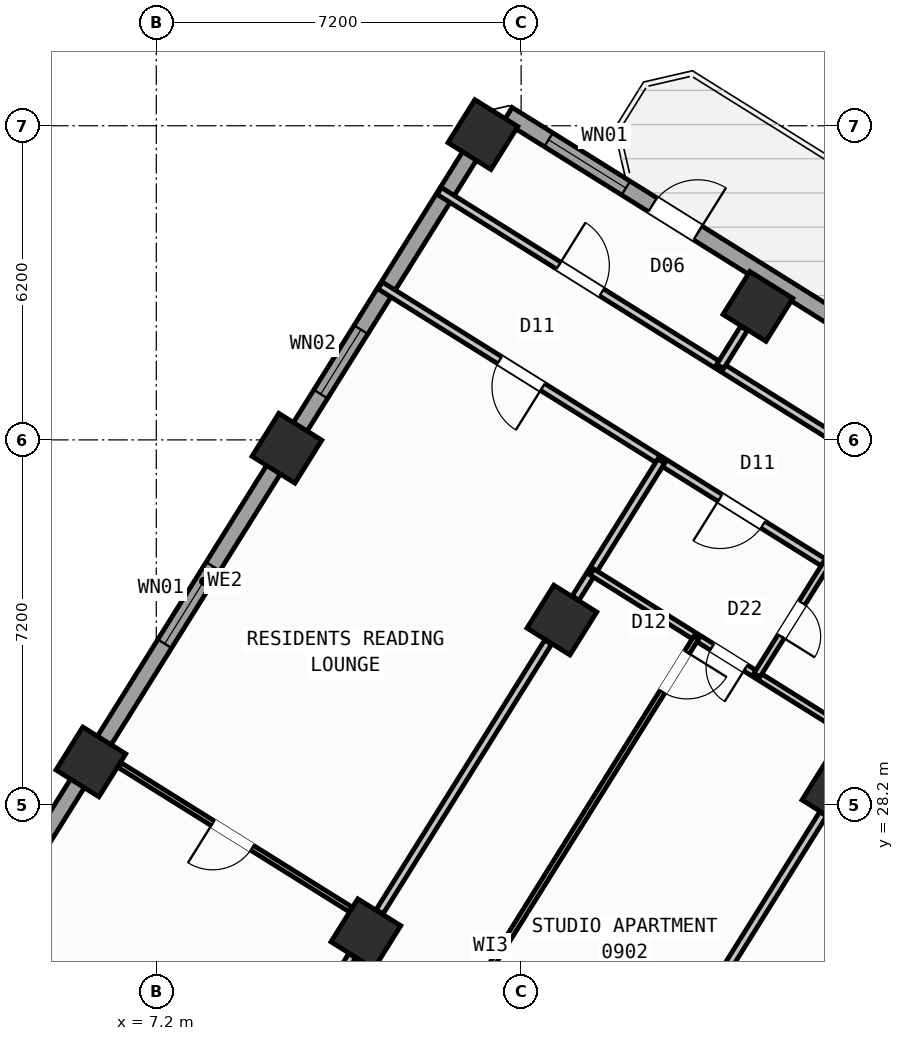
"""IFC4 building model, lengths in metres.
Left out: names, types, materials, properties, quantities, classifications, styles, units other than length and angle.
Written with IfcOpenShell. Run it as: python <this file> out.ifc"""

import sys

from ifc_helpers import new_model, si_unit, direction, frame, frame_2d, origin, origin_2d, place, context, subcontext, project, spatial, rectangle, hollow_rectangle, extrude, source, transform, mapped, element, fill, save


model = new_model("IFC4")
c1 = context("Model", 3, precision=1e-05, world=origin(), true_north=direction((0.0, 1.0)))
c2 = subcontext(c1, "Body", "Model", "MODEL_VIEW")
j1 = project(units=[si_unit("LENGTHUNIT", "METRE"), si_unit("PLANEANGLEUNIT", "RADIAN")], contexts=[c1])
p1 = place(None, origin())
s1 = spatial("IfcSite", under=j1, at=p1, CompositionType="ELEMENT")
p2 = place(p1, origin())
s2 = spatial("IfcBuilding", under=s1, at=p2, CompositionType="ELEMENT")
p3 = place(p2, frame((0.0, 0.0, 38.4)))
s3 = spatial("IfcBuildingStorey", under=s2, at=p3, CompositionType="ELEMENT", Elevation=38.4)
m1 = source(origin(), c2, "Body", "SweptSolid", [
    extrude(hollow_rectangle(XDim=1.0, YDim=1.0, WallThickness=0.04, at=origin_2d()), origin(), (0.0, 0.0, 1.0), 3.6),
])
for number, where, z_axis, x_axis in (
    (1, (20.632, 28.452, 0.0), (0.0, 0.0, 1.0), (-0.848, 0.53, 0.0)),
    (2, (19.073, 38.034, 0.0), (0.0, 0.0, 1.0), (-0.848, 0.53, 0.0)),
    (3, (15.205, 31.844, 0.0), (0.0, 0.0, 1.0), (-0.848, 0.53, 0.0)),
    (4, (11.336, 25.653, 0.0), (0.0, 0.0, 1.0), (-0.848, 0.53, 0.0)),
    (5, (13.646, 41.426, 0.0), (0.0, 0.0, 1.0), (-0.848, 0.53, 0.0)),
    (6, (9.777, 35.235, 0.0), (0.0, 0.0, 1.0), (-0.848, 0.53, 0.0)),
    (7, (5.909, 29.044, 0.0), (0.0, 0.0, 1.0), (-0.848, 0.53, 0.0)),
):
    element("IfcColumn", number, at=place(p3, frame(where, z_axis=z_axis, x_axis=x_axis)), inside=s3, PredefinedType="COLUMN", context=c2, shape_type="MappedRepresentation", body=[
        mapped(m1, transform((0.0, 0.0, 0.0), scale=1.0)),
    ])
p4 = place(p3, frame((2.415, 23.452, 0.0), z_axis=(0.0, 0.0, 1.0), x_axis=(0.52991049553, 0.848053575387, 0.0)))
e8 = element("IfcWall", 8, at=p4, inside=s3, PredefinedType="STANDARD", context=c2, shape_type="SweptSolid", body=[
    extrude(rectangle(XDim=21.587, YDim=0.32, at=frame_2d((10.794, 0.0))), origin(), (0.0, 0.0, 1.0), 2.725),
])
p5 = place(p4, frame((2.356, 0.0, 0.8)))
e9 = element("IfcOpeningElement", 9, at=p5, cuts=e8, PredefinedType="OPENING", context=c2, shape_type="SweptSolid", body=[
    extrude(rectangle(XDim=2.1, YDim=1.55, at=frame_2d((1.05, 0.775))), frame((0.0, 0.17, 0.0), z_axis=(0.0, -1.0, 0.0), x_axis=(1.0, 0.0, 0.0)), (0.0, 0.0, 1.0), 0.34),
])
p6 = place(p4, frame((9.344, 0.0, 0.85)))
e10 = element("IfcOpeningElement", 10, at=p6, cuts=e8, PredefinedType="OPENING", context=c2, shape_type="SweptSolid", body=[
    extrude(rectangle(XDim=1.8, YDim=1.5, at=frame_2d((0.9, 0.75))), frame((0.0, 0.17, 0.0), z_axis=(0.0, -1.0, 0.0), x_axis=(1.0, 0.0, 0.0)), (0.0, 0.0, 1.0), 0.34),
])
p7 = place(p4, frame((15.154, 0.0, 0.85)))
e11 = element("IfcOpeningElement", 11, at=p7, cuts=e8, PredefinedType="OPENING", context=c2, shape_type="SweptSolid", body=[
    extrude(rectangle(XDim=1.5, YDim=1.5, at=frame_2d((0.75, 0.75))), frame((0.0, 0.17, 0.0), z_axis=(0.0, -1.0, 0.0), x_axis=(1.0, 0.0, 0.0)), (0.0, 0.0, 1.0), 0.34),
])
p8 = place(p3, frame((14.138, 41.825, 0.0), z_axis=(0.0, 0.0, 1.0), x_axis=(0.848046498049, -0.529921821731, 0.0)))
e12 = element("IfcWall", 12, at=p8, inside=s3, PredefinedType="STANDARD", context=c2, shape_type="SweptSolid", body=[
    extrude(rectangle(XDim=31.588, YDim=0.32, at=frame_2d((15.794, 0.0))), origin(), (0.0, 0.0, 1.0), 3.35),
])
p9 = place(p8, frame((3.369, 0.0, 0.0)))
e13 = element("IfcOpeningElement", 13, at=p9, cuts=e12, PredefinedType="OPENING", context=c2, shape_type="SweptSolid", body=[
    extrude(rectangle(XDim=1.05, YDim=2.15, at=frame_2d((0.525, 1.075))), frame((0.0, 0.17, 0.0), z_axis=(0.0, -1.0, 0.0), x_axis=(1.0, 0.0, 0.0)), (0.0, 0.0, 1.0), 0.34),
])
p10 = place(p8, frame((0.946, 0.0, 0.85)))
e14 = element("IfcOpeningElement", 14, at=p10, cuts=e12, PredefinedType="OPENING", context=c2, shape_type="SweptSolid", body=[
    extrude(rectangle(XDim=1.8, YDim=1.5, at=frame_2d((0.9, 0.75))), frame((0.0, 0.17, 0.0), z_axis=(0.0, -1.0, 0.0), x_axis=(1.0, 0.0, 0.0)), (0.0, 0.0, 1.0), 0.34),
])
p11 = place(p8, frame((8.46, 0.0, 0.85)))
e15 = element("IfcOpeningElement", 15, at=p11, cuts=e12, PredefinedType="OPENING", context=c2, shape_type="SweptSolid", body=[
    extrude(rectangle(XDim=1.8, YDim=1.5, at=frame_2d((0.9, 0.75))), frame((0.0, 0.17, 0.0), z_axis=(0.0, -1.0, 0.0), x_axis=(1.0, 0.0, 0.0)), (0.0, 0.0, 1.0), 0.34),
])
p12 = place(p8, frame((13.899, 0.0, 0.85)))
e16 = element("IfcOpeningElement", 16, at=p12, cuts=e12, PredefinedType="OPENING", context=c2, shape_type="SweptSolid", body=[
    extrude(rectangle(XDim=1.5, YDim=1.5, at=frame_2d((0.75, 0.75))), frame((0.0, 0.17, 0.0), z_axis=(0.0, -1.0, 0.0), x_axis=(1.0, 0.0, 0.0)), (0.0, 0.0, 1.0), 0.34),
])
p13 = place(p8, frame((22.019, 0.0, 0.95)))
e17 = element("IfcOpeningElement", 17, at=p13, cuts=e12, PredefinedType="OPENING", context=c2, shape_type="SweptSolid", body=[
    extrude(rectangle(XDim=1.2, YDim=1.4, at=frame_2d((0.6, 0.7))), frame((0.0, 0.17, 0.0), z_axis=(0.0, -1.0, 0.0), x_axis=(1.0, 0.0, 0.0)), (0.0, 0.0, 1.0), 0.34),
])
p14 = place(p8, frame((27.569, 0.0, 0.95)))
e18 = element("IfcOpeningElement", 18, at=p14, cuts=e12, PredefinedType="OPENING", context=c2, shape_type="SweptSolid", body=[
    extrude(rectangle(XDim=1.2, YDim=1.4, at=frame_2d((0.6, 0.7))), frame((0.0, 0.17, 0.0), z_axis=(0.0, -1.0, 0.0), x_axis=(1.0, 0.0, 0.0)), (0.0, 0.0, 1.0), 0.34),
])
p15 = place(p3, frame((25.807, 29.582, 0.0), z_axis=(0.0, 0.0, 1.0), x_axis=(-0.529918119251, -0.84804881162, 0.0)))
e19 = element("IfcWall", 19, at=p15, inside=s3, PredefinedType="PARTITIONING", context=c2, shape_type="SweptSolid", body=[
    extrude(rectangle(XDim=17.65, YDim=0.16, at=frame_2d((8.825, 0.0))), origin(), (0.0, 0.0, 1.0), 3.34),
])
p16 = place(p3, frame((26.973, 31.447, 0.0), z_axis=(0.0, 0.0, 1.0), x_axis=(-0.848048310262, 0.529918921593, 0.0)))
e20 = element("IfcWall", 20, at=p16, inside=s3, PredefinedType="PARTITIONING", context=c2, shape_type="SweptSolid", body=[
    extrude(rectangle(XDim=16.73, YDim=0.16, at=frame_2d((8.365, 0.0))), origin(), (0.0, 0.0, 1.0), 3.34),
])
p17 = place(p16, frame((1.588, 0.0, 0.0)))
e21 = element("IfcOpeningElement", 21, at=p17, cuts=e20, PredefinedType="OPENING", context=c2, shape_type="SweptSolid", body=[
    extrude(rectangle(XDim=1.0, YDim=2.1, at=frame_2d((0.5, 1.05))), frame((0.0, 0.09, 0.0), z_axis=(0.0, -1.0, 0.0), x_axis=(1.0, 0.0, 0.0)), (0.0, 0.0, 1.0), 0.18),
])
p18 = place(p16, frame((6.685, 0.0, 0.0)))
e22 = element("IfcOpeningElement", 22, at=p18, cuts=e20, PredefinedType="OPENING", context=c2, shape_type="SweptSolid", body=[
    extrude(rectangle(XDim=1.0, YDim=2.1, at=frame_2d((0.5, 1.05))), frame((0.0, 0.09, 0.0), z_axis=(0.0, -1.0, 0.0), x_axis=(1.0, 0.0, 0.0)), (0.0, 0.0, 1.0), 0.18),
])
p19 = place(p16, frame((12.951, 0.0, 0.0)))
e23 = element("IfcOpeningElement", 23, at=p19, cuts=e20, PredefinedType="OPENING", context=c2, shape_type="SweptSolid", body=[
    extrude(rectangle(XDim=1.0, YDim=2.1, at=frame_2d((0.5, 1.05))), frame((0.0, 0.09, 0.0), z_axis=(0.0, -1.0, 0.0), x_axis=(1.0, 0.0, 0.0)), (0.0, 0.0, 1.0), 0.18),
])
p20 = place(p3, frame((25.807, 29.582, 0.0), z_axis=(0.0, 0.0, 1.0), x_axis=(-0.848052408131, 0.529912363569, 0.0)))
e24 = element("IfcWall", 24, at=p20, inside=s3, PredefinedType="PARTITIONING", context=c2, shape_type="SweptSolid", body=[
    extrude(rectangle(XDim=16.73, YDim=0.16, at=frame_2d((8.365, 0.0))), origin(), (0.0, 0.0, 1.0), 3.34),
])
p21 = place(p20, frame((2.22, 0.0, 0.0)))
e25 = element("IfcOpeningElement", 25, at=p21, cuts=e24, PredefinedType="OPENING", context=c2, shape_type="SweptSolid", body=[
    extrude(rectangle(XDim=0.86, YDim=2.05, at=frame_2d((0.43, 1.025))), frame((0.0, 0.09, 0.0), z_axis=(0.0, -1.0, 0.0), x_axis=(1.0, 0.0, 0.0)), (0.0, 0.0, 1.0), 0.18),
])
p22 = place(p20, frame((7.82, 0.0, 0.0)))
e26 = element("IfcOpeningElement", 26, at=p22, cuts=e24, PredefinedType="OPENING", context=c2, shape_type="SweptSolid", body=[
    extrude(rectangle(XDim=1.0, YDim=2.1, at=frame_2d((0.5, 1.05))), frame((0.0, 0.09, 0.0), z_axis=(0.0, -1.0, 0.0), x_axis=(1.0, 0.0, 0.0)), (0.0, 0.0, 1.0), 0.18),
])
p23 = place(p20, frame((12.95, 0.0, 0.0)))
e27 = element("IfcOpeningElement", 27, at=p23, cuts=e24, PredefinedType="OPENING", context=c2, shape_type="SweptSolid", body=[
    extrude(rectangle(XDim=1.0, YDim=2.1, at=frame_2d((0.5, 1.05))), frame((0.0, 0.09, 0.0), z_axis=(0.0, -1.0, 0.0), x_axis=(1.0, 0.0, 0.0)), (0.0, 0.0, 1.0), 0.18),
])
p24 = place(p3, frame((20.361, 28.018, 0.0), z_axis=(0.0, 0.0, 1.0), x_axis=(-0.529915015264, -0.848050751193, 0.0)))
e28 = element("IfcWall", 28, at=p24, inside=s3, PredefinedType="PARTITIONING", context=c2, shape_type="SweptSolid", body=[
    extrude(rectangle(XDim=6.276, YDim=0.16, at=frame_2d((3.138, 0.0))), origin(), (0.0, 0.0, 1.0), 2.725),
])
p25 = place(p3, frame((17.165, 34.981, 0.0), z_axis=(0.0, 0.0, 1.0), x_axis=(-0.529930102756, -0.848041323399, 0.0)))
e29 = element("IfcWall", 29, at=p25, inside=s3, PredefinedType="PARTITIONING", context=c2, shape_type="SweptSolid", body=[
    extrude(rectangle(XDim=3.188, YDim=0.16, at=frame_2d((1.594, 0.0))), origin(), (0.0, 0.0, 1.0), 2.725),
])
p26 = place(p3, frame((14.933, 31.409, 0.0), z_axis=(0.0, 0.0, 1.0), x_axis=(-0.529897533635, -0.848061674554, 0.0)))
e30 = element("IfcWall", 30, at=p26, inside=s3, PredefinedType="PARTITIONING", context=c2, shape_type="SweptSolid", body=[
    extrude(rectangle(XDim=6.276, YDim=0.16, at=frame_2d((3.138, 0.0))), origin(), (0.0, 0.0, 1.0), 2.725),
])
p27 = place(p3, frame((11.065, 25.219, 0.0), z_axis=(0.0, 0.0, 1.0), x_axis=(-0.529904608059, -0.848057254175, 0.0)))
e31 = element("IfcWall", 31, at=p27, inside=s3, PredefinedType="PARTITIONING", context=c2, shape_type="SweptSolid", body=[
    extrude(rectangle(XDim=5.351, YDim=0.16, at=frame_2d((2.675, 0.0))), origin(), (0.0, 0.0, 1.0), 2.725),
])
p28 = place(p3, frame((21.226, 29.402, 0.0), z_axis=(0.0, 0.0, 1.0), x_axis=(-0.848039019877, 0.529933789039, 0.0)))
e32 = element("IfcWall", 32, at=p28, inside=s3, PredefinedType="PLUMBINGWALL", context=c2, shape_type="SweptSolid", body=[
    extrude(rectangle(XDim=6.4, YDim=0.14, at=frame_2d((3.2, 0.0))), origin(), (0.0, 0.0, 1.0), 3.34),
])
p29 = place(p28, frame((2.824, 0.0, 0.0)))
e33 = element("IfcOpeningElement", 33, at=p29, cuts=e32, PredefinedType="OPENING", context=c2, shape_type="SweptSolid", body=[
    extrude(rectangle(XDim=0.78, YDim=2.05, at=frame_2d((0.39, 1.025))), frame((0.0, 0.08, 0.0), z_axis=(0.0, -1.0, 0.0), x_axis=(1.0, 0.0, 0.0)), (0.0, 0.0, 1.0), 0.16),
])
p30 = place(p3, frame((20.422, 32.947, 0.0), z_axis=(0.0, 0.0, 1.0), x_axis=(-0.529913878929, -0.848051461244, 0.0)))
e34 = element("IfcWall", 34, at=p30, inside=s3, PredefinedType="PLUMBINGWALL", context=c2, shape_type="SweptSolid", body=[
    extrude(rectangle(XDim=2.58, YDim=0.14, at=frame_2d((1.29, 0.0))), origin(), (0.0, 0.0, 1.0), 3.34),
])
p31 = place(p30, frame((0.9, 0.0, 0.0)))
e35 = element("IfcOpeningElement", 35, at=p31, cuts=e34, PredefinedType="OPENING", context=c2, shape_type="SweptSolid", body=[
    extrude(rectangle(XDim=0.78, YDim=2.05, at=frame_2d((0.39, 1.025))), frame((0.0, 0.08, 0.0), z_axis=(0.0, -1.0, 0.0), x_axis=(1.0, 0.0, 0.0)), (0.0, 0.0, 1.0), 0.16),
])
p32 = place(p3, frame((17.861, 31.505, 0.0), z_axis=(0.0, 0.0, 1.0), x_axis=(-0.529928839727, -0.848042112649, 0.0)))
e36 = element("IfcWall", 36, at=p32, inside=s3, PredefinedType="PARTITIONING", context=c2, shape_type="SweptSolid", body=[
    extrude(rectangle(XDim=15.34, YDim=0.11, at=frame_2d((7.67, 0.0))), origin(), (0.0, 0.0, 1.0), 3.34),
])
p33 = place(p32, frame((0.35, 0.0, 0.0)))
e37 = element("IfcOpeningElement", 37, at=p33, cuts=e36, PredefinedType="OPENING", context=c2, shape_type="SweptSolid", body=[
    extrude(rectangle(XDim=0.92, YDim=2.08, at=frame_2d((0.46, 1.04))), frame((0.0, 0.065, 0.0), z_axis=(0.0, -1.0, 0.0), x_axis=(1.0, 0.0, 0.0)), (0.0, 0.0, 1.0), 0.13),
])
p34 = place(p3, frame((11.033, 26.135, 0.0), z_axis=(0.0, 0.0, 1.0), x_axis=(-0.848044224181, 0.529925460639, 0.0)))
e38 = element("IfcWall", 38, at=p34, inside=s3, PredefinedType="PARTITIONING", context=c2, shape_type="SweptSolid", body=[
    extrude(rectangle(XDim=5.376, YDim=0.11, at=frame_2d((2.688, 0.0))), origin(), (0.0, 0.0, 1.0), 2.725),
])
p35 = place(p34, frame((2.288, 0.0, 0.0)))
e39 = element("IfcOpeningElement", 39, at=p35, cuts=e38, PredefinedType="OPENING", context=c2, shape_type="SweptSolid", body=[
    extrude(rectangle(XDim=0.92, YDim=2.08, at=frame_2d((0.46, 1.04))), frame((0.0, 0.065, 0.0), z_axis=(0.0, -1.0, 0.0), x_axis=(1.0, 0.0, 0.0)), (0.0, 0.0, 1.0), 0.13),
])
p36 = place(p3, frame((18.799, 37.602, 0.0), z_axis=(0.0, 0.0, 1.0), x_axis=(-0.529974231203, -0.848013746505, 0.0)))
e40 = element("IfcWall", 40, at=p36, inside=s3, PredefinedType="PARTITIONING", context=c2, shape_type="SweptSolid", body=[
    extrude(rectangle(XDim=0.888, YDim=0.16, at=frame_2d((0.444, 0.0))), origin(), (0.0, 0.0, 1.0), 2.725),
])
m2 = source(origin(), c2, "Body", "SweptSolid", [
    extrude(rectangle(XDim=1.05, YDim=2.15, at=frame_2d((0.525, 1.075))), frame((0.0, 0.025, 0.0), z_axis=(0.0, -1.0, 0.0), x_axis=(1.0, 0.0, 0.0)), (0.0, 0.0, 1.0), 0.05),
])
p37 = place(p9, origin())
e41 = element("IfcDoor", 41, at=p37, inside=s3, OperationType="SINGLE_SWING_RIGHT", PredefinedType="DOOR", context=c2, shape_type="MappedRepresentation", body=[
    mapped(m2, transform((0.0, 0.0, 0.0), scale=1.0)),
])
fill(e13, e41)
m3 = source(origin(), c2, "Body", "SweptSolid", [
    extrude(rectangle(XDim=1.8, YDim=1.5, at=frame_2d((0.9, 0.75))), frame((0.0, 0.03, 0.0), z_axis=(0.0, -1.0, 0.0), x_axis=(1.0, 0.0, 0.0)), (0.0, 0.0, 1.0), 0.06),
])
p38 = place(p6, origin())
e42 = element("IfcWindow", 42, at=p38, inside=s3, PartitioningType="SINGLE_PANEL", PredefinedType="WINDOW", context=c2, shape_type="MappedRepresentation", body=[
    mapped(m3, transform((0.0, 0.0, 0.0), scale=1.0)),
])
fill(e10, e42)
m4 = source(origin(), c2, "Body", "SweptSolid", [
    extrude(rectangle(XDim=1.5, YDim=1.5, at=frame_2d((0.75, 0.75))), frame((0.0, 0.03, 0.0), z_axis=(0.0, -1.0, 0.0), x_axis=(1.0, 0.0, 0.0)), (0.0, 0.0, 1.0), 0.06),
])
p39 = place(p7, origin())
e43 = element("IfcWindow", 43, at=p39, inside=s3, PartitioningType="SINGLE_PANEL", PredefinedType="WINDOW", context=c2, shape_type="MappedRepresentation", body=[
    mapped(m4, transform((0.0, 0.0, 0.0), scale=1.0)),
])
fill(e11, e43)
p40 = place(p10, origin())
e44 = element("IfcWindow", 44, at=p40, inside=s3, PartitioningType="SINGLE_PANEL", PredefinedType="WINDOW", context=c2, shape_type="MappedRepresentation", body=[
    mapped(m3, transform((0.0, 0.0, 0.0), scale=1.0)),
])
fill(e14, e44)
m5 = source(origin(), c2, "Body", "SweptSolid", [
    extrude(rectangle(XDim=0.92, YDim=2.08, at=frame_2d((0.46, 1.04))), frame((0.0, 0.025, 0.0), z_axis=(0.0, -1.0, 0.0), x_axis=(1.0, 0.0, 0.0)), (0.0, 0.0, 1.0), 0.05),
])
p41 = place(p33, origin())
e45 = element("IfcDoor", 45, at=p41, inside=s3, OperationType="SINGLE_SWING_LEFT", PredefinedType="DOOR", context=c2, shape_type="MappedRepresentation", body=[
    mapped(m5, transform((0.0, 0.0, 0.0), scale=1.0)),
])
fill(e37, e45)
m6 = source(origin(), c2, "Body", "SweptSolid", [
    extrude(rectangle(XDim=1.0, YDim=2.1, at=frame_2d((0.5, 1.05))), frame((0.0, 0.025, 0.0), z_axis=(0.0, -1.0, 0.0), x_axis=(1.0, 0.0, 0.0)), (0.0, 0.0, 1.0), 0.05),
])
p42 = place(p22, origin())
e46 = element("IfcDoor", 46, at=p42, inside=s3, OperationType="SINGLE_SWING_RIGHT", PredefinedType="DOOR", context=c2, shape_type="MappedRepresentation", body=[
    mapped(m6, transform((0.0, 0.0, 0.0), scale=1.0)),
])
fill(e26, e46)
m7 = source(origin(), c2, "Body", "SweptSolid", [
    extrude(rectangle(XDim=0.78, YDim=2.05, at=frame_2d((0.39, 1.025))), frame((0.0, 0.025, 0.0), z_axis=(0.0, -1.0, 0.0), x_axis=(1.0, 0.0, 0.0)), (0.0, 0.0, 1.0), 0.05),
])
p43 = place(p29, origin())
e47 = element("IfcDoor", 47, at=p43, inside=s3, OperationType="SINGLE_SWING_LEFT", PredefinedType="DOOR", context=c2, shape_type="MappedRepresentation", body=[
    mapped(m7, transform((0.0, 0.0, 0.0), scale=1.0)),
])
fill(e33, e47)
p44 = place(p31, origin())
e48 = element("IfcDoor", 48, at=p44, inside=s3, OperationType="SINGLE_SWING_RIGHT", PredefinedType="DOOR", context=c2, shape_type="MappedRepresentation", body=[
    mapped(m7, transform((0.0, 0.0, 0.0), scale=1.0)),
])
fill(e35, e48)
p45 = place(p23, origin())
e49 = element("IfcDoor", 49, at=p45, inside=s3, OperationType="SINGLE_SWING_LEFT", PredefinedType="DOOR", context=c2, shape_type="MappedRepresentation", body=[
    mapped(m6, transform((0.0, 0.0, 0.0), scale=1.0)),
])
fill(e27, e49)
p46 = place(p35, origin())
e50 = element("IfcDoor", 50, at=p46, inside=s3, OperationType="SINGLE_SWING_RIGHT", PredefinedType="DOOR", context=c2, shape_type="MappedRepresentation", body=[
    mapped(m5, transform((0.0, 0.0, 0.0), scale=1.0)),
])
fill(e39, e50)
p47 = place(p19, frame((1.0, 0.0, 0.0), z_axis=(0.0, 0.0, 1.0), x_axis=(-1.0, 0.0, 0.0)))
e51 = element("IfcDoor", 51, at=p47, inside=s3, OperationType="SINGLE_SWING_LEFT", PredefinedType="DOOR", context=c2, shape_type="MappedRepresentation", body=[
    mapped(m6, transform((0.0, 0.0, 0.0), scale=1.0)),
])
fill(e23, e51)
save(model, sys.argv[1])
